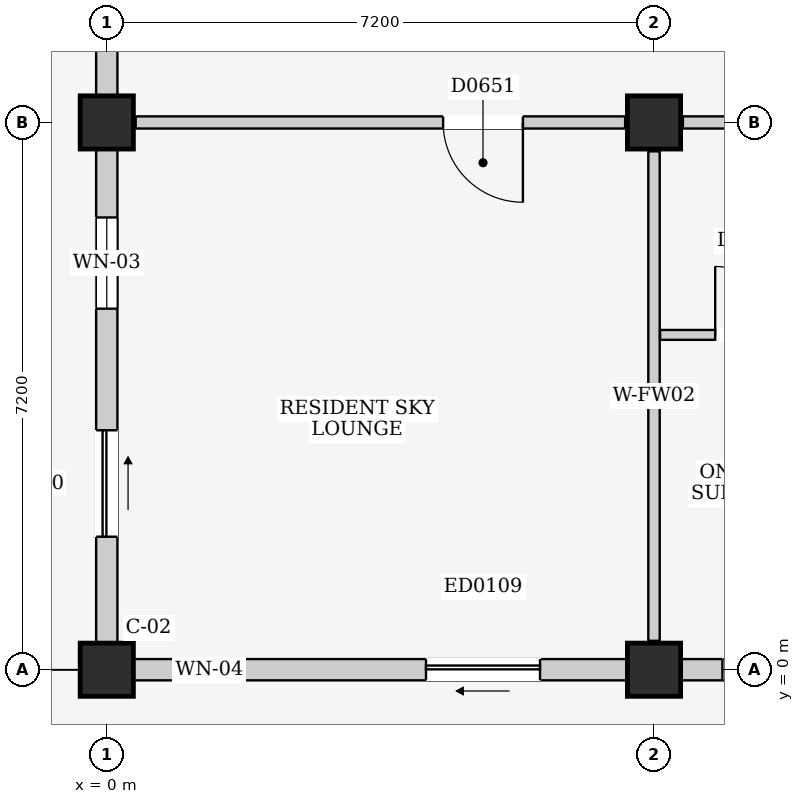
"""IFC4 building model, lengths in metres.
Left out: names, types, materials, properties, quantities, classifications, styles, units other than length and angle.
Written with IfcOpenShell. Run it as: python <this file> out.ifc"""

import sys

from ifc_helpers import new_model, si_unit, direction, frame, frame_2d, origin, origin_2d, place, context, subcontext, project, spatial, rectangle, extrude, element, fill, save


model = new_model("IFC4")
c1 = context("Model", 3, precision=1e-05, world=origin(), true_north=direction((0.0, 1.0)))
c2 = subcontext(c1, "Body", "Model", "MODEL_VIEW")
j1 = project(units=[si_unit("LENGTHUNIT", "METRE"), si_unit("PLANEANGLEUNIT", "RADIAN")], contexts=[c1])
p1 = place(None, origin())
s1 = spatial("IfcSite", under=j1, at=p1, CompositionType="ELEMENT")
p2 = place(p1, origin())
s2 = spatial("IfcBuilding", under=s1, at=p2, CompositionType="ELEMENT")
p3 = place(p2, frame((0.0, 0.0, 4.5)))
s3 = spatial("IfcBuildingStorey", under=s2, at=p3, CompositionType="ELEMENT", Elevation=4.5)
for number, where, z_axis, x_axis in (
    (1, (0.0, 0.0, 0.0), (0.0, 0.0, 1.0), (1.0, 0.0, 0.0)),
    (2, (0.0, 7.2, 0.0), (0.0, 0.0, 1.0), (1.0, 0.0, 0.0)),
    (3, (7.2, 0.0, 0.0), (0.0, 0.0, 1.0), (1.0, 0.0, 0.0)),
    (4, (7.2, 7.2, 0.0), (0.0, 0.0, 1.0), (1.0, 0.0, 0.0)),
):
    element("IfcColumn", number, at=place(p3, frame(where, z_axis=z_axis, x_axis=x_axis)), inside=s3, PredefinedType="COLUMN", context=c2, shape_type="SweptSolid", body=[
        extrude(rectangle(XDim=0.7, YDim=0.7, at=origin_2d()), origin(), (0.0, 0.0, 1.0), 4.5),
    ])
p4 = place(p3, frame((0.35, 0.0, 0.0), z_axis=(0.0, 0.0, 1.0), x_axis=(1.0, 0.0, 0.0)))
e5 = element("IfcWall", 5, at=p4, inside=s3, PredefinedType="ELEMENTEDWALL", context=c2, shape_type="SweptSolid", body=[
    extrude(rectangle(XDim=6.5, YDim=0.28, at=frame_2d((3.25, 0.0))), origin(), (0.0, 0.0, 1.0), 3.715),
])
p5 = place(p4, frame((3.85, 0.0, 0.0)))
e6 = element("IfcOpeningElement", 6, at=p5, cuts=e5, PredefinedType="OPENING", context=c2, shape_type="SweptSolid", body=[
    extrude(rectangle(XDim=1.5, YDim=2.12, at=frame_2d((0.75, 1.06))), frame((0.0, 0.155, 0.0), z_axis=(0.0, -1.0, 0.0), x_axis=(1.0, 0.0, 0.0)), (0.0, 0.0, 1.0), 0.31),
])
p6 = place(p4, frame((0.55, 0.0, 0.9)))
e7 = element("IfcOpeningElement", 7, at=p6, cuts=e5, PredefinedType="OPENING", context=c2, shape_type="SweptSolid", body=[
    extrude(rectangle(XDim=0.9, YDim=1.1, at=frame_2d((0.45, 0.55))), frame((0.0, 0.155, 0.0), z_axis=(0.0, -1.0, 0.0), x_axis=(1.0, 0.0, 0.0)), (0.0, 0.0, 1.0), 0.31),
])
p7 = place(p3, frame((0.0, 0.35, 0.0), z_axis=(0.0, 0.0, 1.0), x_axis=(0.0, 1.0, 0.0)))
e8 = element("IfcWall", 8, at=p7, inside=s3, PredefinedType="ELEMENTEDWALL", context=c2, shape_type="SweptSolid", body=[
    extrude(rectangle(XDim=6.5, YDim=0.28, at=frame_2d((3.25, 0.0))), origin(), (0.0, 0.0, 1.0), 3.715),
])
p8 = place(p7, frame((1.4, 0.0, 0.0)))
e9 = element("IfcOpeningElement", 9, at=p8, cuts=e8, PredefinedType="OPENING", context=c2, shape_type="SweptSolid", body=[
    extrude(rectangle(XDim=1.4, YDim=2.1, at=frame_2d((0.7, 1.05))), frame((0.0, 0.155, 0.0), z_axis=(0.0, -1.0, 0.0), x_axis=(1.0, 0.0, 0.0)), (0.0, 0.0, 1.0), 0.31),
])
p9 = place(p7, frame((4.4, 0.0, 0.95)))
e10 = element("IfcOpeningElement", 10, at=p9, cuts=e8, PredefinedType="OPENING", context=c2, shape_type="SweptSolid", body=[
    extrude(rectangle(XDim=1.2, YDim=1.35, at=frame_2d((0.6, 0.675))), frame((0.0, 0.155, 0.0), z_axis=(0.0, -1.0, 0.0), x_axis=(1.0, 0.0, 0.0)), (0.0, 0.0, 1.0), 0.31),
])
p10 = place(p3, frame((0.0, 7.55, 0.0), z_axis=(0.0, 0.0, 1.0), x_axis=(0.0, 1.0, 0.0)))
e11 = element("IfcWall", 11, at=p10, inside=s3, PredefinedType="ELEMENTEDWALL", context=c2, shape_type="SweptSolid", body=[
    extrude(rectangle(XDim=6.5, YDim=0.28, at=frame_2d((3.25, 0.0))), origin(), (0.0, 0.0, 1.0), 3.715),
])
p11 = place(p10, frame((3.65, 0.0, 0.0)))
e12 = element("IfcOpeningElement", 12, at=p11, cuts=e11, PredefinedType="OPENING", context=c2, shape_type="SweptSolid", body=[
    extrude(rectangle(XDim=1.4, YDim=2.1, at=frame_2d((0.7, 1.05))), frame((0.0, 0.155, 0.0), z_axis=(0.0, -1.0, 0.0), x_axis=(1.0, 0.0, 0.0)), (0.0, 0.0, 1.0), 0.31),
])
p12 = place(p3, frame((7.55, 0.0, 0.0), z_axis=(0.0, 0.0, 1.0), x_axis=(1.0, 0.0, 0.0)))
e13 = element("IfcWall", 13, at=p12, inside=s3, PredefinedType="ELEMENTEDWALL", context=c2, shape_type="SweptSolid", body=[
    extrude(rectangle(XDim=6.5, YDim=0.28, at=frame_2d((3.25, 0.0))), origin(), (0.0, 0.0, 1.0), 3.715),
])
p13 = place(p12, frame((3.8, 0.0, 0.0)))
e14 = element("IfcOpeningElement", 14, at=p13, cuts=e13, PredefinedType="OPENING", context=c2, shape_type="SweptSolid", body=[
    extrude(rectangle(XDim=2.4, YDim=2.12, at=frame_2d((1.2, 1.06))), frame((0.0, 0.155, 0.0), z_axis=(0.0, -1.0, 0.0), x_axis=(1.0, 0.0, 0.0)), (0.0, 0.0, 1.0), 0.31),
])
p14 = place(p12, frame((0.55, 0.0, 0.9)))
e15 = element("IfcOpeningElement", 15, at=p14, cuts=e13, PredefinedType="OPENING", context=c2, shape_type="SweptSolid", body=[
    extrude(rectangle(XDim=2.4, YDim=1.65, at=frame_2d((1.2, 0.825))), frame((0.0, 0.155, 0.0), z_axis=(0.0, -1.0, 0.0), x_axis=(1.0, 0.0, 0.0)), (0.0, 0.0, 1.0), 0.31),
])
p15 = place(p3, frame((0.38, 7.2, 0.0), z_axis=(0.0, 0.0, 1.0), x_axis=(1.0, 0.0, 0.0)))
e16 = element("IfcWall", 16, at=p15, inside=s3, PredefinedType="PARTITIONING", context=c2, shape_type="SweptSolid", body=[
    extrude(rectangle(XDim=6.44, YDim=0.16, at=frame_2d((3.22, 0.0))), origin(), (0.0, 0.0, 1.0), 3.635),
])
p16 = place(p15, frame((4.045, 0.0, 0.0)))
e17 = element("IfcOpeningElement", 17, at=p16, cuts=e16, PredefinedType="OPENING", context=c2, shape_type="SweptSolid", body=[
    extrude(rectangle(XDim=1.05, YDim=2.2, at=frame_2d((0.525, 1.1))), frame((0.0, 0.095, 0.0), z_axis=(0.0, -1.0, 0.0), x_axis=(1.0, 0.0, 0.0)), (0.0, 0.0, 1.0), 0.19),
])
p17 = place(p3, frame((7.2, 0.38, 0.0), z_axis=(0.0, 0.0, 1.0), x_axis=(0.0, 1.0, 0.0)))
e18 = element("IfcWall", 18, at=p17, inside=s3, PredefinedType="PARTITIONING", context=c2, shape_type="SweptSolid", body=[
    extrude(rectangle(XDim=6.44, YDim=0.15, at=frame_2d((3.22, 0.0))), origin(), (0.0, 0.0, 1.0), 3.685),
])
p18 = place(p3, frame((7.58, 7.2, 0.0), z_axis=(0.0, 0.0, 1.0), x_axis=(1.0, 0.0, 0.0)))
e19 = element("IfcWall", 19, at=p18, inside=s3, PredefinedType="PARTITIONING", context=c2, shape_type="SweptSolid", body=[
    extrude(rectangle(XDim=6.44, YDim=0.16, at=frame_2d((3.22, 0.0))), origin(), (0.0, 0.0, 1.0), 3.635),
])
p19 = place(p18, frame((4.77, 0.0, 0.0)))
e20 = element("IfcOpeningElement", 20, at=p19, cuts=e19, PredefinedType="OPENING", context=c2, shape_type="SweptSolid", body=[
    extrude(rectangle(XDim=1.0, YDim=2.15, at=frame_2d((0.5, 1.075))), frame((0.0, 0.095, 0.0), z_axis=(0.0, -1.0, 0.0), x_axis=(1.0, 0.0, 0.0)), (0.0, 0.0, 1.0), 0.19),
])
p20 = place(p3, frame((7.28, 4.405, 0.0), z_axis=(0.0, 0.0, 1.0), x_axis=(1.0, 0.0, 0.0)))
e21 = element("IfcWall", 21, at=p20, inside=s3, PredefinedType="PARTITIONING", context=c2, shape_type="SweptSolid", body=[
    extrude(rectangle(XDim=2.35, YDim=0.13, at=frame_2d((1.175, 0.0))), origin(), (0.0, 0.0, 1.0), 4.25),
])
p21 = place(p20, frame((0.725, 0.0, 0.0)))
e22 = element("IfcOpeningElement", 22, at=p21, cuts=e21, PredefinedType="OPENING", context=c2, shape_type="SweptSolid", body=[
    extrude(rectangle(XDim=0.9, YDim=2.1, at=frame_2d((0.45, 1.05))), frame((0.0, 0.08, 0.0), z_axis=(0.0, -1.0, 0.0), x_axis=(1.0, 0.0, 0.0)), (0.0, 0.0, 1.0), 0.16),
])
p22 = place(p5, frame((1.5, 0.0, 0.0), z_axis=(0.0, 0.0, 1.0), x_axis=(-1.0, 0.0, 0.0)))
e23 = element("IfcDoor", 23, at=p22, inside=s3, OperationType="SLIDING_TO_LEFT", PredefinedType="DOOR", context=c2, shape_type="SweptSolid", body=[
    extrude(rectangle(XDim=1.5, YDim=2.12, at=frame_2d((0.75, 1.06))), frame((0.0, 0.025, 0.0), z_axis=(0.0, -1.0, 0.0), x_axis=(1.0, 0.0, 0.0)), (0.0, 0.0, 1.0), 0.05),
])
fill(e6, e23)
p23 = place(p6, origin())
e24 = element("IfcWindow", 24, at=p23, inside=s3, PartitioningType="SINGLE_PANEL", PredefinedType="WINDOW", context=c2, shape_type="SweptSolid", body=[
    extrude(rectangle(XDim=0.9, YDim=1.1, at=frame_2d((0.45, 0.55))), frame((0.0, 0.03, 0.0), z_axis=(0.0, -1.0, 0.0), x_axis=(1.0, 0.0, 0.0)), (0.0, 0.0, 1.0), 0.06),
])
fill(e7, e24)
p24 = place(p8, frame((1.4, 0.0, 0.0), z_axis=(0.0, 0.0, 1.0), x_axis=(-1.0, 0.0, 0.0)))
e25 = element("IfcDoor", 25, at=p24, inside=s3, OperationType="SLIDING_TO_RIGHT", PredefinedType="DOOR", context=c2, shape_type="SweptSolid", body=[
    extrude(rectangle(XDim=1.4, YDim=2.1, at=frame_2d((0.7, 1.05))), frame((0.0, 0.025, 0.0), z_axis=(0.0, -1.0, 0.0), x_axis=(1.0, 0.0, 0.0)), (0.0, 0.0, 1.0), 0.05),
])
fill(e9, e25)
p25 = place(p9, origin())
e26 = element("IfcWindow", 26, at=p25, inside=s3, PartitioningType="SINGLE_PANEL", PredefinedType="WINDOW", context=c2, shape_type="SweptSolid", body=[
    extrude(rectangle(XDim=1.2, YDim=1.35, at=frame_2d((0.6, 0.675))), frame((0.0, 0.03, 0.0), z_axis=(0.0, -1.0, 0.0), x_axis=(1.0, 0.0, 0.0)), (0.0, 0.0, 1.0), 0.06),
])
fill(e10, e26)
p26 = place(p14, origin())
e27 = element("IfcWindow", 27, at=p26, inside=s3, PartitioningType="TRIPLE_PANEL_VERTICAL", PredefinedType="WINDOW", context=c2, shape_type="SweptSolid", body=[
    extrude(rectangle(XDim=2.4, YDim=1.65, at=frame_2d((1.2, 0.825))), frame((0.0, 0.03, 0.0), z_axis=(0.0, -1.0, 0.0), x_axis=(1.0, 0.0, 0.0)), (0.0, 0.0, 1.0), 0.06),
])
fill(e15, e27)
p27 = place(p16, frame((1.05, 0.0, 0.0), z_axis=(0.0, 0.0, 1.0), x_axis=(-1.0, 0.0, 0.0)))
e28 = element("IfcDoor", 28, at=p27, inside=s3, OperationType="SINGLE_SWING_LEFT", PredefinedType="DOOR", context=c2, shape_type="SweptSolid", body=[
    extrude(rectangle(XDim=1.05, YDim=2.2, at=frame_2d((0.525, 1.1))), frame((0.0, 0.025, 0.0), z_axis=(0.0, -1.0, 0.0), x_axis=(1.0, 0.0, 0.0)), (0.0, 0.0, 1.0), 0.05),
])
fill(e17, e28)
p28 = place(p21, origin())
e29 = element("IfcDoor", 29, at=p28, inside=s3, OperationType="SINGLE_SWING_LEFT", PredefinedType="DOOR", context=c2, shape_type="SweptSolid", body=[
    extrude(rectangle(XDim=0.9, YDim=2.1, at=frame_2d((0.45, 1.05))), frame((0.0, 0.025, 0.0), z_axis=(0.0, -1.0, 0.0), x_axis=(1.0, 0.0, 0.0)), (0.0, 0.0, 1.0), 0.05),
])
fill(e22, e29)
save(model, sys.argv[1])
